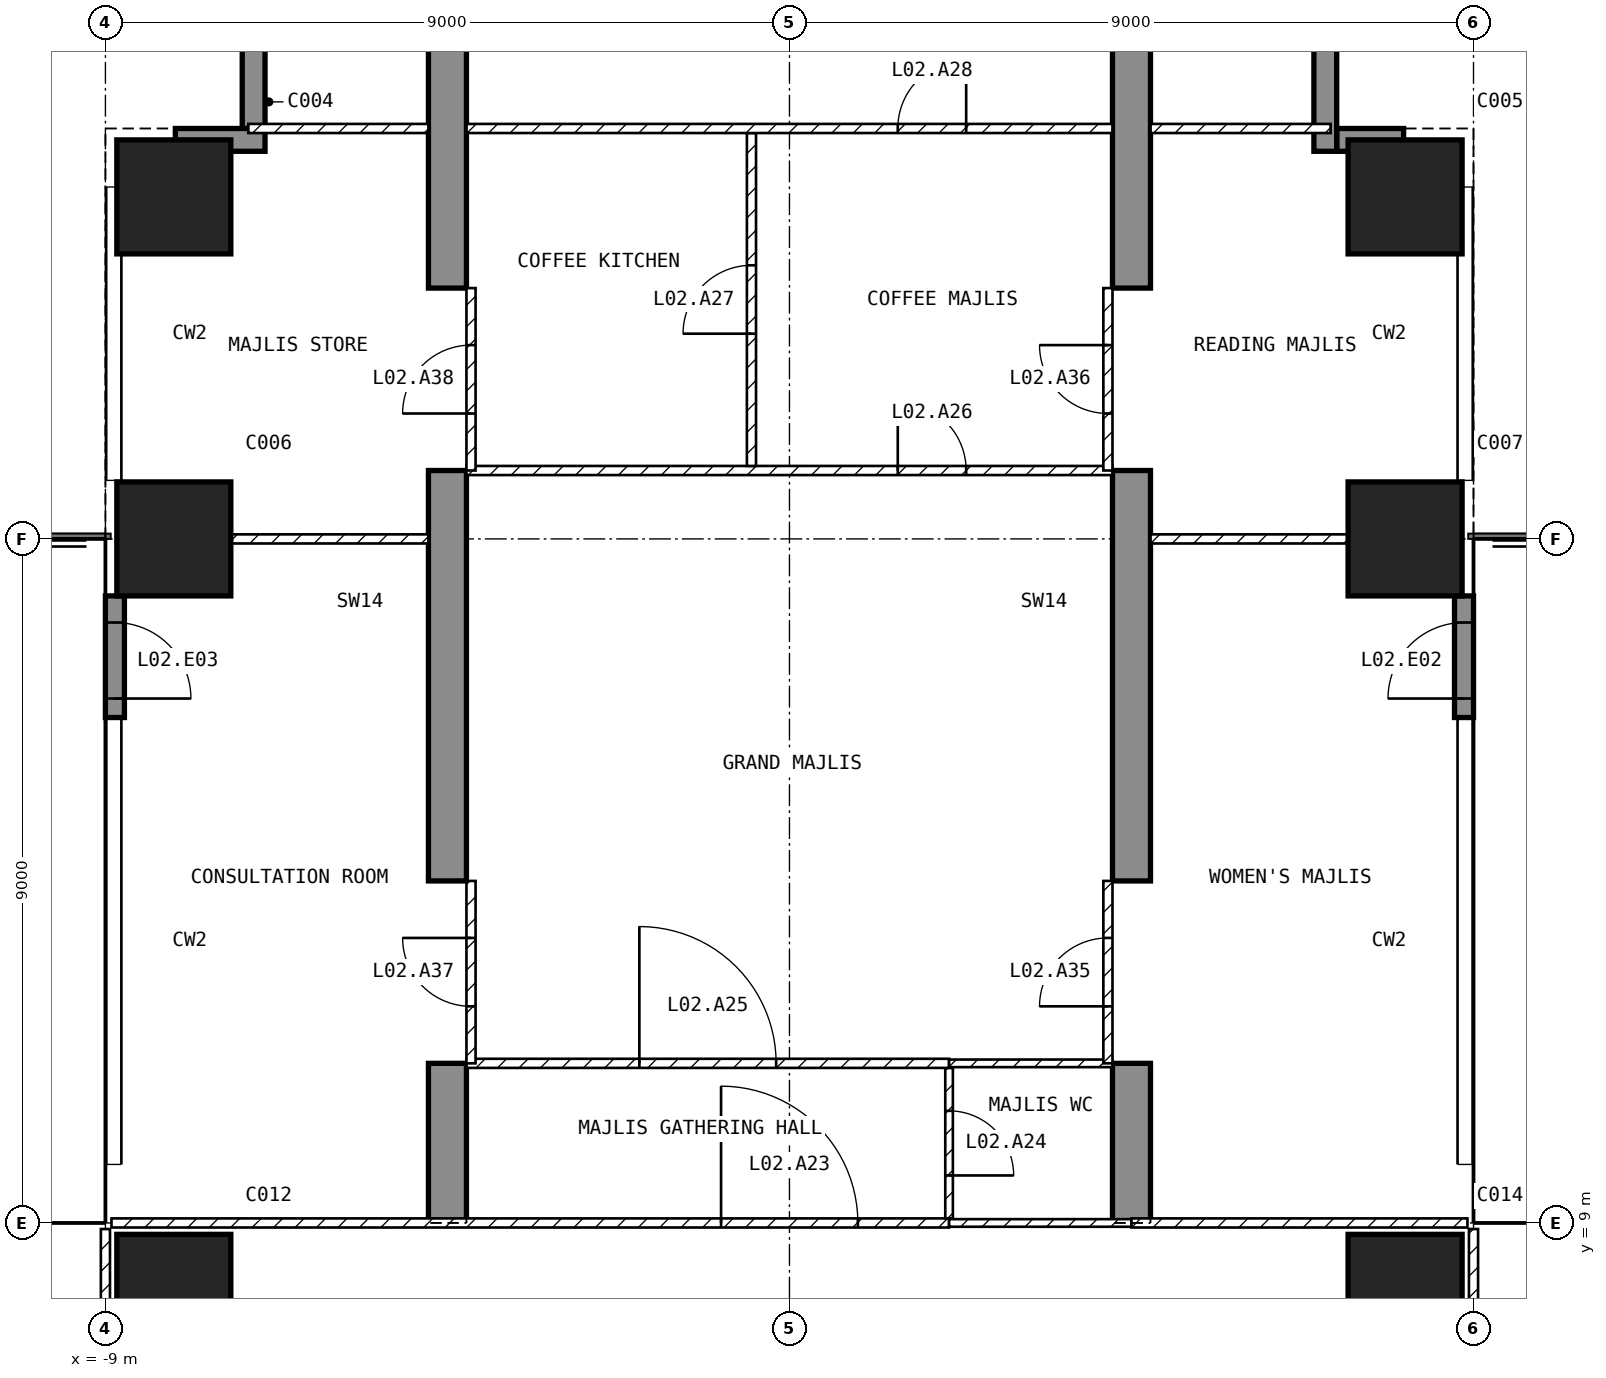
"""IFC4 building model, lengths in metres.
Left out: names, types, materials, properties, quantities, classifications, styles, units other than length and angle.
Written with IfcOpenShell. Run it as: python <this file> out.ifc"""

import sys

from ifc_helpers import new_model, si_unit, direction, frame, frame_2d, origin, origin_2d, place, context, subcontext, project, spatial, polyline, rectangle, outline, extrude, element, fill, save


model = new_model("IFC4")
c1 = context("Model", 3, precision=1e-05, world=origin(), true_north=direction((0.0, 1.0)))
c2 = subcontext(c1, "Body", "Model", "MODEL_VIEW")
j1 = project(units=[si_unit("LENGTHUNIT", "METRE"), si_unit("PLANEANGLEUNIT", "RADIAN")], contexts=[c1])
p1 = place(None, origin())
s1 = spatial("IfcSite", under=j1, at=p1, CompositionType="ELEMENT")
p2 = place(p1, origin())
s2 = spatial("IfcBuilding", under=s1, at=p2, CompositionType="ELEMENT")
p3 = place(p2, frame((0.0, 0.0, 21.0)))
s3 = spatial("IfcBuildingStorey", under=s2, at=p3, CompositionType="ELEMENT", Elevation=21.0)
for number, where, z_axis, x_axis in (
    (1, (-8.1, 8.1, -1.4), (0.0, 0.0, 1.0), (1.0, 0.0, 0.0)),
    (2, (-8.1, 18.0, -1.4), (0.0, 0.0, 1.0), (1.0, 0.0, 0.0)),
    (3, (-8.1, 22.5, -1.4), (0.0, 0.0, 1.0), (1.0, 0.0, 0.0)),
    (4, (8.1, 8.1, -1.4), (0.0, 0.0, 1.0), (1.0, 0.0, 0.0)),
    (5, (8.1, 18.0, -1.4), (0.0, 0.0, 1.0), (1.0, 0.0, 0.0)),
    (6, (8.1, 22.5, -1.4), (0.0, 0.0, 1.0), (1.0, 0.0, 0.0)),
):
    element("IfcColumn", number, at=place(p3, frame(where, z_axis=z_axis, x_axis=x_axis)), inside=s3, PredefinedType="COLUMN", context=c2, shape_type="SweptSolid", body=[
        extrude(rectangle(XDim=1.5, YDim=1.5, at=origin_2d()), origin(), (0.0, 0.0, 1.0), 6.95),
    ])
for number, where, z_axis, x_axis in (
    (7, (-4.75, 9.0, -0.3), (1.0, 0.0, 0.0), (0.0, 1.0, 0.0)),
    (8, (4.25, 9.0, -0.3), (1.0, 0.0, 0.0), (0.0, 1.0, 0.0)),
):
    element("IfcWall", number, at=place(p3, frame(where, z_axis=z_axis, x_axis=x_axis)), inside=s3, PredefinedType="SHEAR", context=c2, shape_type="SweptSolid", body=[
        extrude(outline(polyline([(0.0, 0.0), (2.1, 0.0), (2.1, 2.7), (4.5, 2.7), (4.5, 0.0), (9.9, 0.0), (9.9, 2.7), (12.3, 2.7), (12.3, 0.0), (16.35, 0.0), (16.35, 5.85), (0.0, 5.85), (0.0, 0.0)])), origin(), (0.0, 0.0, 1.0), 0.5),
    ])
p4 = place(p3, frame((8.875, 15.65, 0.0), z_axis=(0.0, 0.0, 1.0), x_axis=(0.0, 1.0, 0.0)))
e9 = element("IfcWall", 9, at=p4, inside=s3, PredefinedType="SOLIDWALL", context=c2, shape_type="SweptSolid", body=[
    extrude(rectangle(XDim=1.6, YDim=0.25, at=frame_2d((0.8, 0.0))), origin(), (0.0, 0.0, 1.0), 5.55),
])
p5 = place(p4, frame((0.25, 0.0, 0.0)))
e10 = element("IfcOpeningElement", 10, at=p5, cuts=e9, PredefinedType="OPENING", context=c2, shape_type="SweptSolid", body=[
    extrude(rectangle(XDim=1.0, YDim=2.4, at=frame_2d((0.5, 1.2))), frame((0.0, 0.135, 0.0), z_axis=(0.0, -1.0, 0.0), x_axis=(1.0, 0.0, 0.0)), (0.0, 0.0, 1.0), 0.27),
])
p6 = place(p3, frame((-8.875, 17.25, 0.0), z_axis=(0.0, 0.0, 1.0), x_axis=(0.0, -1.0, 0.0)))
e11 = element("IfcWall", 11, at=p6, inside=s3, PredefinedType="SOLIDWALL", context=c2, shape_type="SweptSolid", body=[
    extrude(rectangle(XDim=1.6, YDim=0.25, at=frame_2d((0.8, 0.0))), origin(), (0.0, 0.0, 1.0), 5.55),
])
p7 = place(p6, frame((0.35, 0.0, 0.0)))
e12 = element("IfcOpeningElement", 12, at=p7, cuts=e11, PredefinedType="OPENING", context=c2, shape_type="SweptSolid", body=[
    extrude(rectangle(XDim=1.0, YDim=2.4, at=frame_2d((0.5, 1.2))), frame((0.0, 0.135, 0.0), z_axis=(0.0, -1.0, 0.0), x_axis=(1.0, 0.0, 0.0)), (0.0, 0.0, 1.0), 0.27),
])
p8 = place(p3, frame((8.08, 23.25, 0.0), z_axis=(0.0, 0.0, 1.0), x_axis=(-1.0, 0.0, 0.0)))
e13 = element("IfcWall", 13, at=p8, inside=s3, PredefinedType="SOLIDWALL", context=c2, shape_type="SweptSolid", body=[
    extrude(rectangle(XDim=0.88, YDim=0.3, at=frame_2d((0.44, 0.0))), origin(), (0.0, 0.0, 1.0), 5.55),
])
p9 = place(p3, frame((7.05, 23.1, 0.0), z_axis=(0.0, 0.0, 1.0), x_axis=(0.0, 1.0, 0.0)))
e14 = element("IfcWall", 14, at=p9, inside=s3, PredefinedType="SOLIDWALL", context=c2, shape_type="SweptSolid", body=[
    extrude(rectangle(XDim=1.8, YDim=0.3, at=frame_2d((0.9, 0.0))), origin(), (0.0, 0.0, 1.0), 5.55),
])
p10 = place(p3, frame((-7.05, 25.2, 0.0), z_axis=(0.0, 0.0, 1.0), x_axis=(0.0, -1.0, 0.0)))
e15 = element("IfcWall", 15, at=p10, inside=s3, PredefinedType="SOLIDWALL", context=c2, shape_type="SweptSolid", body=[
    extrude(rectangle(XDim=1.8, YDim=0.3, at=frame_2d((0.9, 0.0))), origin(), (0.0, 0.0, 1.0), 5.55),
])
p11 = place(p3, frame((-6.9, 23.25, 0.0), z_axis=(0.0, 0.0, 1.0), x_axis=(-1.0, 0.0, 0.0)))
e16 = element("IfcWall", 16, at=p11, inside=s3, PredefinedType="SOLIDWALL", context=c2, shape_type="SweptSolid", body=[
    extrude(rectangle(XDim=1.18, YDim=0.3, at=frame_2d((0.59, 0.0))), origin(), (0.0, 0.0, 1.0), 5.55),
])
p12 = place(p3, frame((9.0, 8.92, 0.0), z_axis=(0.0, 0.0, 1.0), x_axis=(0.0, -1.0, 0.0)))
e17 = element("IfcWall", 17, at=p12, inside=s3, PredefinedType="PARTITIONING", context=c2, shape_type="SweptSolid", body=[
    extrude(rectangle(XDim=7.66, YDim=0.12, at=frame_2d((3.83, 0.0))), origin(), (0.0, 0.0, 1.0), 5.55),
])
p13 = place(p3, frame((-9.0, 1.26, 0.0), z_axis=(0.0, 0.0, 1.0), x_axis=(0.0, 1.0, 0.0)))
e18 = element("IfcWall", 18, at=p13, inside=s3, PredefinedType="PARTITIONING", context=c2, shape_type="SweptSolid", body=[
    extrude(rectangle(XDim=7.66, YDim=0.12, at=frame_2d((3.83, 0.0))), origin(), (0.0, 0.0, 1.0), 5.55),
])
p14 = place(p13, frame((3.99, 0.0, 0.0)))
e19 = element("IfcOpeningElement", 19, at=p14, cuts=e18, PredefinedType="OPENING", context=c2, shape_type="SweptSolid", body=[
    extrude(rectangle(XDim=0.9, YDim=2.1, at=frame_2d((0.45, 1.05))), frame((0.0, 0.07, 0.0), z_axis=(0.0, -1.0, 0.0), x_axis=(1.0, 0.0, 0.0)), (0.0, 0.0, 1.0), 0.14),
])
p15 = place(p3, frame((-8.92, 9.0, 0.0), z_axis=(0.0, 0.0, 1.0), x_axis=(1.0, 0.0, 0.0)))
e20 = element("IfcWall", 20, at=p15, inside=s3, PredefinedType="PARTITIONING", context=c2, shape_type="SweptSolid", body=[
    extrude(rectangle(XDim=11.02, YDim=0.12, at=frame_2d((5.51, 0.0))), origin(), (0.0, 0.0, 1.0), 5.55),
])
p16 = place(p15, frame((8.02, 0.0, 0.0)))
e21 = element("IfcOpeningElement", 21, at=p16, cuts=e20, PredefinedType="OPENING", context=c2, shape_type="SweptSolid", body=[
    extrude(rectangle(XDim=1.8, YDim=2.1, at=frame_2d((0.9, 1.05))), frame((0.0, 0.07, 0.0), z_axis=(0.0, -1.0, 0.0), x_axis=(1.0, 0.0, 0.0)), (0.0, 0.0, 1.0), 0.14),
])
p17 = place(p3, frame((2.1, 9.0, 0.0), z_axis=(0.0, 0.0, 1.0), x_axis=(1.0, 0.0, 0.0)))
e22 = element("IfcWall", 22, at=p17, inside=s3, PredefinedType="PARTITIONING", context=c2, shape_type="SweptSolid", body=[
    extrude(rectangle(XDim=2.4, YDim=0.1, at=frame_2d((1.2, 0.0))), origin(), (0.0, 0.0, 1.0), 5.55),
])
p18 = place(p3, frame((4.5, 9.0, 0.0), z_axis=(0.0, 0.0, 1.0), x_axis=(1.0, 0.0, 0.0)))
e23 = element("IfcWall", 23, at=p18, inside=s3, PredefinedType="PARTITIONING", context=c2, shape_type="SweptSolid", body=[
    extrude(rectangle(XDim=4.42, YDim=0.12, at=frame_2d((2.21, 0.0))), origin(), (0.0, 0.0, 1.0), 5.55),
])
p19 = place(p3, frame((2.1, 11.04, 0.0), z_axis=(0.0, 0.0, 1.0), x_axis=(0.0, -1.0, 0.0)))
e24 = element("IfcWall", 24, at=p19, inside=s3, PredefinedType="PARTITIONING", context=c2, shape_type="SweptSolid", body=[
    extrude(rectangle(XDim=1.98, YDim=0.1, at=frame_2d((0.99, 0.0))), origin(), (0.0, 0.0, 1.0), 5.55),
])
p20 = place(p19, frame((0.565, 0.0, 0.0)))
e25 = element("IfcOpeningElement", 25, at=p20, cuts=e24, PredefinedType="OPENING", context=c2, shape_type="SweptSolid", body=[
    extrude(rectangle(XDim=0.85, YDim=2.1, at=frame_2d((0.425, 1.05))), frame((0.0, 0.06, 0.0), z_axis=(0.0, -1.0, 0.0), x_axis=(1.0, 0.0, 0.0)), (0.0, 0.0, 1.0), 0.12),
])
p21 = place(p3, frame((-4.25, 11.1, 0.0), z_axis=(0.0, 0.0, 1.0), x_axis=(1.0, 0.0, 0.0)))
e26 = element("IfcWall", 26, at=p21, inside=s3, PredefinedType="PARTITIONING", context=c2, shape_type="SweptSolid", body=[
    extrude(rectangle(XDim=6.35, YDim=0.12, at=frame_2d((3.175, 0.0))), origin(), (0.0, 0.0, 1.0), 5.55),
])
p22 = place(p21, frame((2.275, 0.0, 0.0)))
e27 = element("IfcOpeningElement", 27, at=p22, cuts=e26, PredefinedType="OPENING", context=c2, shape_type="SweptSolid", body=[
    extrude(rectangle(XDim=1.8, YDim=2.1, at=frame_2d((0.9, 1.05))), frame((0.0, 0.07, 0.0), z_axis=(0.0, -1.0, 0.0), x_axis=(1.0, 0.0, 0.0)), (0.0, 0.0, 1.0), 0.14),
])
p23 = place(p3, frame((2.1, 11.1, 0.0), z_axis=(0.0, 0.0, 1.0), x_axis=(1.0, 0.0, 0.0)))
e28 = element("IfcWall", 28, at=p23, inside=s3, PredefinedType="PARTITIONING", context=c2, shape_type="SweptSolid", body=[
    extrude(rectangle(XDim=2.15, YDim=0.1, at=frame_2d((1.075, 0.0))), origin(), (0.0, 0.0, 1.0), 5.55),
])
p24 = place(p3, frame((-4.25, 18.9, 0.0), z_axis=(0.0, 0.0, 1.0), x_axis=(1.0, 0.0, 0.0)))
e29 = element("IfcWall", 29, at=p24, inside=s3, PredefinedType="PARTITIONING", context=c2, shape_type="SweptSolid", body=[
    extrude(rectangle(XDim=8.5, YDim=0.12, at=frame_2d((4.25, 0.0))), origin(), (0.0, 0.0, 1.0), 5.55),
])
p25 = place(p24, frame((5.675, 0.0, 0.0)))
e30 = element("IfcOpeningElement", 30, at=p25, cuts=e29, PredefinedType="OPENING", context=c2, shape_type="SweptSolid", body=[
    extrude(rectangle(XDim=0.9, YDim=2.1, at=frame_2d((0.45, 1.05))), frame((0.0, 0.07, 0.0), z_axis=(0.0, -1.0, 0.0), x_axis=(1.0, 0.0, 0.0)), (0.0, 0.0, 1.0), 0.14),
])
p26 = place(p3, frame((-0.5, 18.96, 0.0), z_axis=(0.0, 0.0, 1.0), x_axis=(0.0, 1.0, 0.0)))
e31 = element("IfcWall", 31, at=p26, inside=s3, PredefinedType="PARTITIONING", context=c2, shape_type="SweptSolid", body=[
    extrude(rectangle(XDim=4.38, YDim=0.12, at=frame_2d((2.19, 0.0))), origin(), (0.0, 0.0, 1.0), 5.55),
])
p27 = place(p26, frame((1.74, 0.0, 0.0)))
e32 = element("IfcOpeningElement", 32, at=p27, cuts=e31, PredefinedType="OPENING", context=c2, shape_type="SweptSolid", body=[
    extrude(rectangle(XDim=0.9, YDim=2.1, at=frame_2d((0.45, 1.05))), frame((0.0, 0.07, 0.0), z_axis=(0.0, -1.0, 0.0), x_axis=(1.0, 0.0, 0.0)), (0.0, 0.0, 1.0), 0.14),
])
p28 = place(p3, frame((-4.25, 23.4, 0.0), z_axis=(0.0, 0.0, 1.0), x_axis=(1.0, 0.0, 0.0)))
e33 = element("IfcWall", 33, at=p28, inside=s3, PredefinedType="PARTITIONING", context=c2, shape_type="SweptSolid", body=[
    extrude(rectangle(XDim=8.5, YDim=0.12, at=frame_2d((4.25, 0.0))), origin(), (0.0, 0.0, 1.0), 5.55),
])
p29 = place(p28, frame((5.675, 0.0, 0.0)))
e34 = element("IfcOpeningElement", 34, at=p29, cuts=e33, PredefinedType="OPENING", context=c2, shape_type="SweptSolid", body=[
    extrude(rectangle(XDim=0.9, YDim=2.1, at=frame_2d((0.45, 1.05))), frame((0.0, 0.07, 0.0), z_axis=(0.0, -1.0, 0.0), x_axis=(1.0, 0.0, 0.0)), (0.0, 0.0, 1.0), 0.14),
])
p30 = place(p3, frame((4.75, 18.0, 0.0), z_axis=(0.0, 0.0, 1.0), x_axis=(1.0, 0.0, 0.0)))
e35 = element("IfcWall", 35, at=p30, inside=s3, PredefinedType="PARTITIONING", context=c2, shape_type="SweptSolid", body=[
    extrude(rectangle(XDim=2.6, YDim=0.12, at=frame_2d((1.3, 0.0))), origin(), (0.0, 0.0, 1.0), 4.57),
])
p31 = place(p3, frame((4.75, 23.4, 0.0), z_axis=(0.0, 0.0, 1.0), x_axis=(1.0, 0.0, 0.0)))
e36 = element("IfcWall", 36, at=p31, inside=s3, PredefinedType="PARTITIONING", context=c2, shape_type="SweptSolid", body=[
    extrude(rectangle(XDim=2.37, YDim=0.12, at=frame_2d((1.185, 0.0))), origin(), (0.0, 0.0, 1.0), 5.55),
])
p32 = place(p3, frame((-7.35, 18.0, 0.0), z_axis=(0.0, 0.0, 1.0), x_axis=(1.0, 0.0, 0.0)))
e37 = element("IfcWall", 37, at=p32, inside=s3, PredefinedType="PARTITIONING", context=c2, shape_type="SweptSolid", body=[
    extrude(rectangle(XDim=2.6, YDim=0.12, at=frame_2d((1.3, 0.0))), origin(), (0.0, 0.0, 1.0), 4.57),
])
p33 = place(p3, frame((-7.12, 23.4, 0.0), z_axis=(0.0, 0.0, 1.0), x_axis=(1.0, 0.0, 0.0)))
e38 = element("IfcWall", 38, at=p33, inside=s3, PredefinedType="PARTITIONING", context=c2, shape_type="SweptSolid", body=[
    extrude(rectangle(XDim=2.37, YDim=0.12, at=frame_2d((1.185, 0.0))), origin(), (0.0, 0.0, 1.0), 5.55),
])
p34 = place(p3, frame((4.19, 11.1, 0.0), z_axis=(0.0, 0.0, 1.0), x_axis=(0.0, 1.0, 0.0)))
e39 = element("IfcWall", 39, at=p34, inside=s3, PredefinedType="PARTITIONING", context=c2, shape_type="SweptSolid", body=[
    extrude(rectangle(XDim=2.4, YDim=0.12, at=frame_2d((1.2, 0.0))), origin(), (0.0, 0.0, 1.0), 2.4),
])
p35 = place(p34, frame((0.75, 0.0, 0.0)))
e40 = element("IfcOpeningElement", 40, at=p35, cuts=e39, PredefinedType="OPENING", context=c2, shape_type="SweptSolid", body=[
    extrude(rectangle(XDim=0.9, YDim=2.1, at=frame_2d((0.45, 1.05))), frame((0.0, 0.07, 0.0), z_axis=(0.0, -1.0, 0.0), x_axis=(1.0, 0.0, 0.0)), (0.0, 0.0, 1.0), 0.14),
])
p36 = place(p3, frame((4.19, 18.9, 0.0), z_axis=(0.0, 0.0, 1.0), x_axis=(0.0, 1.0, 0.0)))
e41 = element("IfcWall", 41, at=p36, inside=s3, PredefinedType="PARTITIONING", context=c2, shape_type="SweptSolid", body=[
    extrude(rectangle(XDim=2.4, YDim=0.12, at=frame_2d((1.2, 0.0))), origin(), (0.0, 0.0, 1.0), 2.4),
])
p37 = place(p36, frame((0.75, 0.0, 0.0)))
e42 = element("IfcOpeningElement", 42, at=p37, cuts=e41, PredefinedType="OPENING", context=c2, shape_type="SweptSolid", body=[
    extrude(rectangle(XDim=0.9, YDim=2.1, at=frame_2d((0.45, 1.05))), frame((0.0, 0.07, 0.0), z_axis=(0.0, -1.0, 0.0), x_axis=(1.0, 0.0, 0.0)), (0.0, 0.0, 1.0), 0.14),
])
p38 = place(p3, frame((-4.19, 11.1, 0.0), z_axis=(0.0, 0.0, 1.0), x_axis=(0.0, 1.0, 0.0)))
e43 = element("IfcWall", 43, at=p38, inside=s3, PredefinedType="PARTITIONING", context=c2, shape_type="SweptSolid", body=[
    extrude(rectangle(XDim=2.4, YDim=0.12, at=frame_2d((1.2, 0.0))), origin(), (0.0, 0.0, 1.0), 2.4),
])
p39 = place(p38, frame((0.75, 0.0, 0.0)))
e44 = element("IfcOpeningElement", 44, at=p39, cuts=e43, PredefinedType="OPENING", context=c2, shape_type="SweptSolid", body=[
    extrude(rectangle(XDim=0.9, YDim=2.1, at=frame_2d((0.45, 1.05))), frame((0.0, 0.07, 0.0), z_axis=(0.0, -1.0, 0.0), x_axis=(1.0, 0.0, 0.0)), (0.0, 0.0, 1.0), 0.14),
])
p40 = place(p3, frame((-4.19, 18.9, 0.0), z_axis=(0.0, 0.0, 1.0), x_axis=(0.0, 1.0, 0.0)))
e45 = element("IfcWall", 45, at=p40, inside=s3, PredefinedType="PARTITIONING", context=c2, shape_type="SweptSolid", body=[
    extrude(rectangle(XDim=2.4, YDim=0.12, at=frame_2d((1.2, 0.0))), origin(), (0.0, 0.0, 1.0), 2.4),
])
p41 = place(p40, frame((0.75, 0.0, 0.0)))
e46 = element("IfcOpeningElement", 46, at=p41, cuts=e45, PredefinedType="OPENING", context=c2, shape_type="SweptSolid", body=[
    extrude(rectangle(XDim=0.9, YDim=2.1, at=frame_2d((0.45, 1.05))), frame((0.0, 0.07, 0.0), z_axis=(0.0, -1.0, 0.0), x_axis=(1.0, 0.0, 0.0)), (0.0, 0.0, 1.0), 0.14),
])
p42 = place(p5, origin())
e47 = element("IfcDoor", 47, at=p42, inside=s3, OperationType="SINGLE_SWING_LEFT", PredefinedType="DOOR", context=c2, shape_type="SweptSolid", body=[
    extrude(rectangle(XDim=1.0, YDim=2.4, at=frame_2d((0.5, 1.2))), frame((0.0, 0.025, 0.0), z_axis=(0.0, -1.0, 0.0), x_axis=(1.0, 0.0, 0.0)), (0.0, 0.0, 1.0), 0.05),
])
fill(e10, e47)
p43 = place(p7, origin())
e48 = element("IfcDoor", 48, at=p43, inside=s3, OperationType="SINGLE_SWING_RIGHT", PredefinedType="DOOR", context=c2, shape_type="SweptSolid", body=[
    extrude(rectangle(XDim=1.0, YDim=2.4, at=frame_2d((0.5, 1.2))), frame((0.0, 0.025, 0.0), z_axis=(0.0, -1.0, 0.0), x_axis=(1.0, 0.0, 0.0)), (0.0, 0.0, 1.0), 0.05),
])
fill(e12, e48)
p44 = place(p16, origin())
e49 = element("IfcDoor", 49, at=p44, inside=s3, OperationType="SINGLE_SWING_LEFT", PredefinedType="DOOR", context=c2, shape_type="SweptSolid", body=[
    extrude(rectangle(XDim=1.8, YDim=2.1, at=frame_2d((0.9, 1.05))), frame((0.0, 0.025, 0.0), z_axis=(0.0, -1.0, 0.0), x_axis=(1.0, 0.0, 0.0)), (0.0, 0.0, 1.0), 0.05),
])
fill(e21, e49)
p45 = place(p20, origin())
e50 = element("IfcDoor", 50, at=p45, inside=s3, OperationType="SINGLE_SWING_RIGHT", PredefinedType="DOOR", context=c2, shape_type="SweptSolid", body=[
    extrude(rectangle(XDim=0.85, YDim=2.1, at=frame_2d((0.425, 1.05))), frame((0.0, 0.025, 0.0), z_axis=(0.0, -1.0, 0.0), x_axis=(1.0, 0.0, 0.0)), (0.0, 0.0, 1.0), 0.05),
])
fill(e25, e50)
p46 = place(p22, origin())
e51 = element("IfcDoor", 51, at=p46, inside=s3, OperationType="SINGLE_SWING_LEFT", PredefinedType="DOOR", context=c2, shape_type="SweptSolid", body=[
    extrude(rectangle(XDim=1.8, YDim=2.1, at=frame_2d((0.9, 1.05))), frame((0.0, 0.025, 0.0), z_axis=(0.0, -1.0, 0.0), x_axis=(1.0, 0.0, 0.0)), (0.0, 0.0, 1.0), 0.05),
])
fill(e27, e51)
p47 = place(p25, origin())
e52 = element("IfcDoor", 52, at=p47, inside=s3, OperationType="SINGLE_SWING_LEFT", PredefinedType="DOOR", context=c2, shape_type="SweptSolid", body=[
    extrude(rectangle(XDim=0.9, YDim=2.1, at=frame_2d((0.45, 1.05))), frame((0.0, 0.025, 0.0), z_axis=(0.0, -1.0, 0.0), x_axis=(1.0, 0.0, 0.0)), (0.0, 0.0, 1.0), 0.05),
])
fill(e30, e52)
p48 = place(p27, origin())
e53 = element("IfcDoor", 53, at=p48, inside=s3, OperationType="SINGLE_SWING_LEFT", PredefinedType="DOOR", context=c2, shape_type="SweptSolid", body=[
    extrude(rectangle(XDim=0.9, YDim=2.1, at=frame_2d((0.45, 1.05))), frame((0.0, 0.025, 0.0), z_axis=(0.0, -1.0, 0.0), x_axis=(1.0, 0.0, 0.0)), (0.0, 0.0, 1.0), 0.05),
])
fill(e32, e53)
p49 = place(p29, origin())
e54 = element("IfcDoor", 54, at=p49, inside=s3, OperationType="SINGLE_SWING_RIGHT", PredefinedType="DOOR", context=c2, shape_type="SweptSolid", body=[
    extrude(rectangle(XDim=0.9, YDim=2.1, at=frame_2d((0.45, 1.05))), frame((0.0, 0.025, 0.0), z_axis=(0.0, -1.0, 0.0), x_axis=(1.0, 0.0, 0.0)), (0.0, 0.0, 1.0), 0.05),
])
fill(e34, e54)
p50 = place(p35, origin())
e55 = element("IfcDoor", 55, at=p50, inside=s3, OperationType="SINGLE_SWING_LEFT", PredefinedType="DOOR", context=c2, shape_type="SweptSolid", body=[
    extrude(rectangle(XDim=0.9, YDim=2.1, at=frame_2d((0.45, 1.05))), frame((0.0, 0.025, 0.0), z_axis=(0.0, -1.0, 0.0), x_axis=(1.0, 0.0, 0.0)), (0.0, 0.0, 1.0), 0.05),
])
fill(e40, e55)
p51 = place(p37, origin())
e56 = element("IfcDoor", 56, at=p51, inside=s3, OperationType="SINGLE_SWING_RIGHT", PredefinedType="DOOR", context=c2, shape_type="SweptSolid", body=[
    extrude(rectangle(XDim=0.9, YDim=2.1, at=frame_2d((0.45, 1.05))), frame((0.0, 0.025, 0.0), z_axis=(0.0, -1.0, 0.0), x_axis=(1.0, 0.0, 0.0)), (0.0, 0.0, 1.0), 0.05),
])
fill(e42, e56)
p52 = place(p39, origin())
e57 = element("IfcDoor", 57, at=p52, inside=s3, OperationType="SINGLE_SWING_RIGHT", PredefinedType="DOOR", context=c2, shape_type="SweptSolid", body=[
    extrude(rectangle(XDim=0.9, YDim=2.1, at=frame_2d((0.45, 1.05))), frame((0.0, 0.025, 0.0), z_axis=(0.0, -1.0, 0.0), x_axis=(1.0, 0.0, 0.0)), (0.0, 0.0, 1.0), 0.05),
])
fill(e44, e57)
p53 = place(p41, origin())
e58 = element("IfcDoor", 58, at=p53, inside=s3, OperationType="SINGLE_SWING_LEFT", PredefinedType="DOOR", context=c2, shape_type="SweptSolid", body=[
    extrude(rectangle(XDim=0.9, YDim=2.1, at=frame_2d((0.45, 1.05))), frame((0.0, 0.025, 0.0), z_axis=(0.0, -1.0, 0.0), x_axis=(1.0, 0.0, 0.0)), (0.0, 0.0, 1.0), 0.05),
])
fill(e46, e58)
save(model, sys.argv[1])
